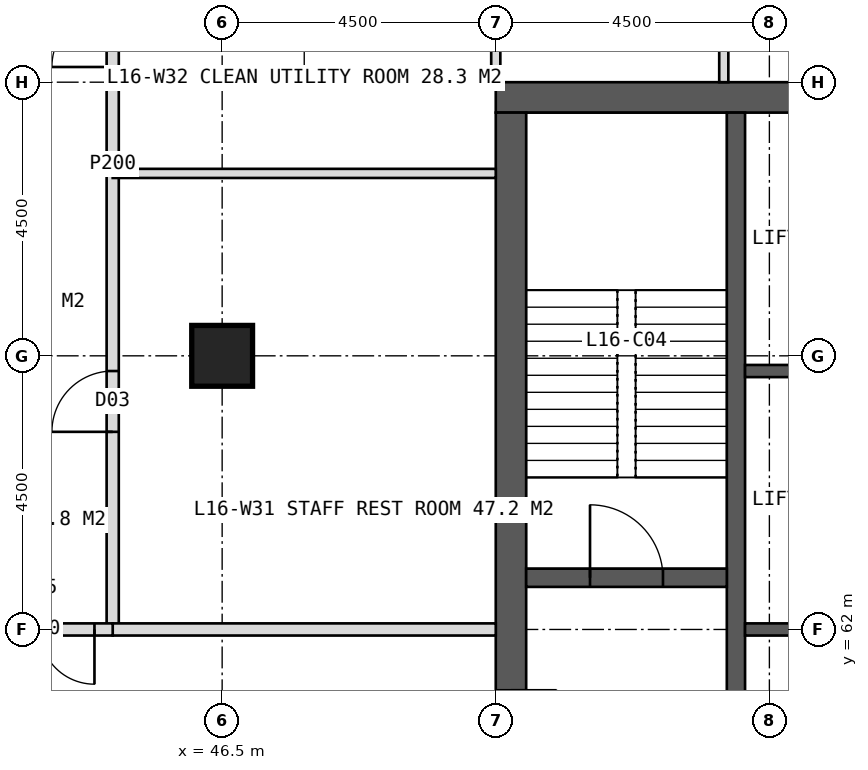
"""IFC4 building model, lengths in metres.
Left out: names, types, materials, properties, quantities, classifications, styles, units other than length and angle.
Written with IfcOpenShell. Run it as: python <this file> out.ifc"""

import sys

from ifc_helpers import new_model, si_unit, direction, frame, frame_2d, origin, origin_2d, place, context, subcontext, project, spatial, rectangle, hollow_rectangle, extrude, element, fill, save


model = new_model("IFC4")
c1 = context("Model", 3, precision=1e-05, world=origin(), true_north=direction((0.0, 1.0)))
c2 = subcontext(c1, "Body", "Model", "MODEL_VIEW")
j1 = project(units=[si_unit("LENGTHUNIT", "METRE"), si_unit("PLANEANGLEUNIT", "RADIAN")], contexts=[c1])
p1 = place(None, origin())
s1 = spatial("IfcSite", under=j1, at=p1, CompositionType="ELEMENT")
p2 = place(p1, origin())
s2 = spatial("IfcBuilding", under=s1, at=p2, CompositionType="ELEMENT")
p3 = place(p2, frame((0.0, 0.0, 71.0)))
s3 = spatial("IfcBuildingStorey", under=s2, at=p3, CompositionType="ELEMENT", Elevation=71.0)
p4 = place(p3, frame((51.0, 70.75, 0.0), z_axis=(0.0, 0.0, 1.0), x_axis=(1.0, 0.0, 0.0)))
e1 = element("IfcWall", 1, at=p4, inside=s3, PredefinedType="SHEAR", context=c2, shape_type="SweptSolid", body=[
    extrude(rectangle(XDim=18.0, YDim=0.5, at=frame_2d((9.0, 0.0))), origin(), (0.0, 0.0, 1.0), 4.0),
])
p5 = place(p4, frame((8.1, 0.0, 0.0)))
e2 = element("IfcOpeningElement", 2, at=p5, cuts=e1, PredefinedType="OPENING", context=c2, shape_type="SweptSolid", body=[
    extrude(rectangle(XDim=1.8, YDim=2.2, at=frame_2d((0.9, 1.1))), frame((0.0, 0.26, 0.0), z_axis=(0.0, -1.0, 0.0), x_axis=(1.0, 0.0, 0.0)), (0.0, 0.0, 1.0), 0.52),
])
p6 = place(p3, frame((51.25, 53.5, 0.0), z_axis=(0.0, 0.0, 1.0), x_axis=(0.0, 1.0, 0.0)))
e3 = element("IfcWall", 3, at=p6, inside=s3, PredefinedType="SHEAR", context=c2, shape_type="SweptSolid", body=[
    extrude(rectangle(XDim=17.0, YDim=0.5, at=frame_2d((8.5, 0.0))), origin(), (0.0, 0.0, 1.0), 4.0),
])
p7 = place(p6, frame((6.0, 0.0, 0.0)))
e4 = element("IfcOpeningElement", 4, at=p7, cuts=e3, PredefinedType="OPENING", context=c2, shape_type="SweptSolid", body=[
    extrude(rectangle(XDim=1.5, YDim=2.2, at=frame_2d((0.75, 1.1))), frame((0.0, 0.26, 0.0), z_axis=(0.0, -1.0, 0.0), x_axis=(1.0, 0.0, 0.0)), (0.0, 0.0, 1.0), 0.52),
])
p8 = place(p3, frame((54.95, 53.5, 0.0), z_axis=(0.0, 0.0, 1.0), x_axis=(0.0, 1.0, 0.0)))
e5 = element("IfcWall", 5, at=p8, inside=s3, PredefinedType="SHEAR", context=c2, shape_type="SweptSolid", body=[
    extrude(rectangle(XDim=17.0, YDim=0.3, at=frame_2d((8.5, 0.0))), origin(), (0.0, 0.0, 1.0), 4.0),
])
for number, where, z_axis, x_axis in (
    (6, (55.1, 62.0, 0.0), (0.0, 0.0, 1.0), (1.0, 0.0, 0.0)),
    (7, (55.1, 66.25, 0.0), (0.0, 0.0, 1.0), (1.0, 0.0, 0.0)),
):
    element("IfcWall", number, at=place(p3, frame(where, z_axis=z_axis, x_axis=x_axis)), inside=s3, PredefinedType="SHEAR", context=c2, shape_type="SweptSolid", body=[
        extrude(rectangle(XDim=3.05, YDim=0.2, at=frame_2d((1.525, 0.0))), origin(), (0.0, 0.0, 1.0), 4.0),
    ])
p9 = place(p3, frame((51.5, 62.85, 0.0), z_axis=(0.0, 0.0, 1.0), x_axis=(1.0, 0.0, 0.0)))
e8 = element("IfcWall", 8, at=p9, inside=s3, PredefinedType="SHEAR", context=c2, shape_type="SweptSolid", body=[
    extrude(rectangle(XDim=3.3, YDim=0.3, at=frame_2d((1.65, 0.0))), origin(), (0.0, 0.0, 1.0), 4.0),
])
p10 = place(p9, frame((1.05, 0.0, 0.0)))
e9 = element("IfcOpeningElement", 9, at=p10, cuts=e8, PredefinedType="OPENING", context=c2, shape_type="SweptSolid", body=[
    extrude(rectangle(XDim=1.2, YDim=2.1, at=frame_2d((0.6, 1.05))), frame((0.0, 0.16, 0.0), z_axis=(0.0, -1.0, 0.0), x_axis=(1.0, 0.0, 0.0)), (0.0, 0.0, 1.0), 0.32),
])
p11 = place(p3, frame((46.5, 66.5, 0.0), z_axis=(0.0, 0.0, 1.0), x_axis=(1.0, 0.0, 0.0)))
e10 = element("IfcColumn", 10, at=p11, inside=s3, PredefinedType="COLUMN", context=c2, shape_type="SweptSolid", body=[
    extrude(hollow_rectangle(XDim=1.0, YDim=1.0, WallThickness=0.1, at=origin_2d()), origin(), (0.0, 0.0, 1.0), 4.0),
])
p12 = place(p3, frame((51.0, 71.0, 0.0), z_axis=(0.0, 0.0, 1.0), x_axis=(0.0, 1.0, 0.0)))
e11 = element("IfcWall", 11, at=p12, inside=s3, PredefinedType="PARTITIONING", context=c2, shape_type="SweptSolid", body=[
    extrude(rectangle(XDim=6.3, YDim=0.15, at=frame_2d((3.15, 0.0))), origin(), (0.0, 0.0, 1.0), 3.75),
])
p13 = place(p3, frame((54.75, 71.0, 0.0), z_axis=(0.0, 0.0, 1.0), x_axis=(0.0, 1.0, 0.0)))
e12 = element("IfcWall", 12, at=p13, inside=s3, PredefinedType="PARTITIONING", context=c2, shape_type="SweptSolid", body=[
    extrude(rectangle(XDim=2.4, YDim=0.15, at=frame_2d((1.2, 0.0))), origin(), (0.0, 0.0, 1.0), 3.75),
])
p14 = place(p3, frame((44.7, 62.0, 0.0), z_axis=(0.0, 0.0, 1.0), x_axis=(0.0, 1.0, 0.0)))
e13 = element("IfcWall", 13, at=p14, inside=s3, PredefinedType="PARTITIONING", context=c2, shape_type="SweptSolid", body=[
    extrude(rectangle(XDim=15.3, YDim=0.2, at=frame_2d((7.65, 0.0))), origin(), (0.0, 0.0, 1.0), 3.75),
])
p15 = place(p14, frame((3.25, 0.0, 0.0)))
e14 = element("IfcOpeningElement", 14, at=p15, cuts=e13, PredefinedType="OPENING", context=c2, shape_type="SweptSolid", body=[
    extrude(rectangle(XDim=1.0, YDim=2.1, at=frame_2d((0.5, 1.05))), frame((0.0, 0.11, 0.0), z_axis=(0.0, -1.0, 0.0), x_axis=(1.0, 0.0, 0.0)), (0.0, 0.0, 1.0), 0.22),
])
p16 = place(p14, frame((9.25, 0.0, 0.0)))
e15 = element("IfcOpeningElement", 15, at=p16, cuts=e13, PredefinedType="OPENING", context=c2, shape_type="SweptSolid", body=[
    extrude(rectangle(XDim=1.0, YDim=2.1, at=frame_2d((0.5, 1.05))), frame((0.0, 0.11, 0.0), z_axis=(0.0, -1.0, 0.0), x_axis=(1.0, 0.0, 0.0)), (0.0, 0.0, 1.0), 0.22),
])
p17 = place(p14, frame((13.15, 0.0, 0.0)))
e16 = element("IfcOpeningElement", 16, at=p17, cuts=e13, PredefinedType="OPENING", context=c2, shape_type="SweptSolid", body=[
    extrude(rectangle(XDim=1.0, YDim=2.1, at=frame_2d((0.5, 1.05))), frame((0.0, 0.11, 0.0), z_axis=(0.0, -1.0, 0.0), x_axis=(1.0, 0.0, 0.0)), (0.0, 0.0, 1.0), 0.22),
])
p18 = place(p3, frame((51.0, 62.0, 0.0), z_axis=(0.0, 0.0, 1.0), x_axis=(-1.0, 0.0, 0.0)))
e17 = element("IfcWall", 17, at=p18, inside=s3, PredefinedType="SOLIDWALL", context=c2, shape_type="SweptSolid", body=[
    extrude(rectangle(XDim=6.3, YDim=0.2, at=frame_2d((3.15, 0.0))), origin(), (0.0, 0.0, 1.0), 2.75),
])
p19 = place(p3, frame((51.0, 69.5, 0.0), z_axis=(0.0, 0.0, 1.0), x_axis=(-1.0, 0.0, 0.0)))
e18 = element("IfcWall", 18, at=p19, inside=s3, PredefinedType="PARTITIONING", context=c2, shape_type="SweptSolid", body=[
    extrude(rectangle(XDim=6.3, YDim=0.15, at=frame_2d((3.15, 0.0))), origin(), (0.0, 0.0, 1.0), 3.75),
])
p20 = place(p3, frame((44.7, 62.0, 0.0), z_axis=(0.0, 0.0, 1.0), x_axis=(-1.0, 0.0, 0.0)))
e19 = element("IfcWall", 19, at=p20, inside=s3, PredefinedType="SOLIDWALL", context=c2, shape_type="SweptSolid", body=[
    extrude(rectangle(XDim=2.7, YDim=0.2, at=frame_2d((1.35, 0.0))), origin(), (0.0, 0.0, 1.0), 2.75),
])
p21 = place(p20, frame((0.3, 0.0, 0.0)))
e20 = element("IfcOpeningElement", 20, at=p21, cuts=e19, PredefinedType="OPENING", context=c2, shape_type="SweptSolid", body=[
    extrude(rectangle(XDim=1.8, YDim=2.2, at=frame_2d((0.9, 1.1))), frame((0.0, 0.11, 0.0), z_axis=(0.0, -1.0, 0.0), x_axis=(1.0, 0.0, 0.0)), (0.0, 0.0, 1.0), 0.22),
])
p22 = place(p15, origin())
e21 = element("IfcDoor", 21, at=p22, inside=s3, OperationType="SINGLE_SWING_LEFT", PredefinedType="DOOR", context=c2, shape_type="SweptSolid", body=[
    extrude(rectangle(XDim=1.0, YDim=2.1, at=frame_2d((0.5, 1.05))), frame((0.0, 0.025, 0.0), z_axis=(0.0, -1.0, 0.0), x_axis=(1.0, 0.0, 0.0)), (0.0, 0.0, 1.0), 0.05),
])
fill(e14, e21)
p23 = place(p16, origin())
e22 = element("IfcDoor", 22, at=p23, inside=s3, OperationType="SINGLE_SWING_LEFT", PredefinedType="DOOR", context=c2, shape_type="SweptSolid", body=[
    extrude(rectangle(XDim=1.0, YDim=2.1, at=frame_2d((0.5, 1.05))), frame((0.0, 0.025, 0.0), z_axis=(0.0, -1.0, 0.0), x_axis=(1.0, 0.0, 0.0)), (0.0, 0.0, 1.0), 0.05),
])
fill(e15, e22)
p24 = place(p21, origin())
e23 = element("IfcDoor", 23, at=p24, inside=s3, OperationType="DOUBLE_DOOR_DOUBLE_SWING", PredefinedType="DOOR", context=c2, shape_type="SweptSolid", body=[
    extrude(rectangle(XDim=1.8, YDim=2.2, at=frame_2d((0.9, 1.1))), frame((0.0, 0.025, 0.0), z_axis=(0.0, -1.0, 0.0), x_axis=(1.0, 0.0, 0.0)), (0.0, 0.0, 1.0), 0.05),
])
fill(e20, e23)
p25 = place(p10, origin())
e24 = element("IfcDoor", 24, at=p25, inside=s3, OperationType="SINGLE_SWING_LEFT", PredefinedType="DOOR", context=c2, shape_type="SweptSolid", body=[
    extrude(rectangle(XDim=1.2, YDim=2.1, at=frame_2d((0.6, 1.05))), frame((0.0, 0.025, 0.0), z_axis=(0.0, -1.0, 0.0), x_axis=(1.0, 0.0, 0.0)), (0.0, 0.0, 1.0), 0.05),
])
fill(e9, e24)
save(model, sys.argv[1])
